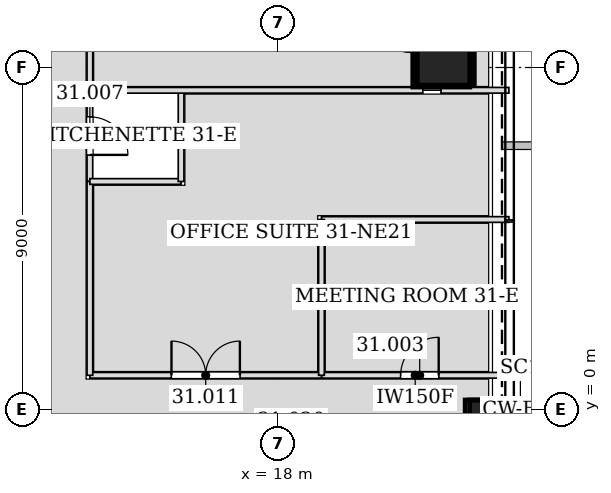
"""IFC4 building model, lengths in metres.
Left out: names, types, materials, properties, quantities, classifications, styles, units other than length and angle.
Written with IfcOpenShell. Run it as: python <this file> out.ifc"""

import sys

from ifc_helpers import new_model, si_unit, direction, frame, frame_2d, origin, origin_2d, place, context, subcontext, project, spatial, rectangle, hollow_rectangle, extrude, element, fill, save


model = new_model("IFC4")
c1 = context("Model", 3, precision=1e-05, world=origin(), true_north=direction((0.0, 1.0)))
c2 = subcontext(c1, "Body", "Model", "MODEL_VIEW")
j1 = project(units=[si_unit("LENGTHUNIT", "METRE"), si_unit("PLANEANGLEUNIT", "RADIAN")], contexts=[c1])
p1 = place(None, origin())
s1 = spatial("IfcSite", under=j1, at=p1, CompositionType="ELEMENT")
p2 = place(p1, origin())
s2 = spatial("IfcBuilding", under=s1, at=p2, CompositionType="ELEMENT")
p3 = place(p2, frame((0.0, 0.0, 138.6)))
s3 = spatial("IfcBuildingStorey", under=s2, at=p3, CompositionType="ELEMENT", Elevation=138.6)
p4 = place(p3, frame((22.416, 9.285, 0.0), z_axis=(-0.028295730207, -0.011736627314, 0.99953069149), x_axis=(0.383133442967, -0.923693003589, 0.0)))
e1 = element("IfcColumn", 1, at=p4, inside=s3, PredefinedType="COLUMN", context=c2, shape_type="SweptSolid", body=[
    extrude(hollow_rectangle(XDim=1.5, YDim=1.5, WallThickness=0.07, at=origin_2d()), origin(), (0.0, 0.0, 1.0), 4.202),
])
p5 = place(p3, frame((23.294, 0.0, 0.0), z_axis=(-0.028297679255, 0.0, 0.99959954049), x_axis=(0.0, -1.0, 0.0)))
e2 = element("IfcColumn", 2, at=p5, inside=s3, PredefinedType="COLUMN", context=c2, shape_type="SweptSolid", body=[
    extrude(hollow_rectangle(XDim=0.5, YDim=0.5, WallThickness=0.025, at=origin_2d()), origin(), (0.0, 0.0, 1.0), 4.202),
])
p6 = place(p3, frame((24.078, 0.9, 0.0), z_axis=(0.0, 0.0, 1.0), x_axis=(-1.0, 0.0, 0.0)))
e3 = element("IfcWall", 3, at=p6, inside=s3, PredefinedType="PARTITIONING", context=c2, shape_type="SweptSolid", body=[
    extrude(rectangle(XDim=4.935, YDim=0.15, at=frame_2d((2.468, 0.0))), origin(), (0.0, 0.0, 1.0), 3.426),
])
p7 = place(p6, frame((1.85, 0.0, 0.0)))
e4 = element("IfcOpeningElement", 4, at=p7, cuts=e3, PredefinedType="OPENING", context=c2, shape_type="SweptSolid", body=[
    extrude(rectangle(XDim=1.0, YDim=2.1, at=frame_2d((0.5, 1.05))), frame((0.0, 0.085, 0.0), z_axis=(0.0, -1.0, 0.0), x_axis=(1.0, 0.0, 0.0)), (0.0, 0.0, 1.0), 0.17),
])
p8 = place(p3, frame((13.05, 5.999, 0.0), z_axis=(0.0, 0.0, 1.0), x_axis=(0.0, 1.0, 0.0)))
e5 = element("IfcWall", 5, at=p8, inside=s3, PredefinedType="PARTITIONING", context=c2, shape_type="SweptSolid", body=[
    extrude(rectangle(XDim=2.402, YDim=0.15, at=frame_2d((1.201, 0.0))), origin(), (0.0, 0.0, 1.0), 4.035),
])
p9 = place(p8, frame((0.701, 0.0, 0.0)))
e6 = element("IfcOpeningElement", 6, at=p9, cuts=e5, PredefinedType="OPENING", context=c2, shape_type="SweptSolid", body=[
    extrude(rectangle(XDim=1.0, YDim=2.1, at=frame_2d((0.5, 1.05))), frame((0.0, 0.085, 0.0), z_axis=(0.0, -1.0, 0.0), x_axis=(1.0, 0.0, 0.0)), (0.0, 0.0, 1.0), 0.17),
])
p10 = place(p3, frame((19.145, 0.9, 0.0), z_axis=(0.0, 0.0, 1.0), x_axis=(-1.0, 0.0, 0.0)))
e7 = element("IfcWall", 7, at=p10, inside=s3, PredefinedType="PARTITIONING", context=c2, shape_type="SweptSolid", body=[
    extrude(rectangle(XDim=6.095, YDim=0.15, at=frame_2d((3.047, 0.0))), origin(), (0.0, 0.0, 1.0), 3.426),
])
p11 = place(p10, frame((2.147, 0.0, 0.0)))
e8 = element("IfcOpeningElement", 8, at=p11, cuts=e7, PredefinedType="OPENING", context=c2, shape_type="SweptSolid", body=[
    extrude(rectangle(XDim=1.8, YDim=2.4, at=frame_2d((0.9, 1.2))), frame((0.0, 0.085, 0.0), z_axis=(0.0, -1.0, 0.0), x_axis=(1.0, 0.0, 0.0)), (0.0, 0.0, 1.0), 0.17),
])
p12 = place(p3, frame((13.05, 0.9, 0.0), z_axis=(0.0, 0.0, 1.0), x_axis=(0.0, 1.0, 0.0)))
e9 = element("IfcWall", 9, at=p12, inside=s3, PredefinedType="PARTITIONING", context=c2, shape_type="SweptSolid", body=[
    extrude(rectangle(XDim=5.101, YDim=0.15, at=frame_2d((2.551, 0.0))), origin(), (0.0, 0.0, 1.0), 4.035),
])
p13 = place(p3, frame((13.05, 8.399, 0.0), z_axis=(0.0, 0.0, 1.0), x_axis=(0.0, 1.0, 0.0)))
e10 = element("IfcWall", 10, at=p13, inside=s3, PredefinedType="PARTITIONING", context=c2, shape_type="SweptSolid", body=[
    extrude(rectangle(XDim=4.651, YDim=0.15, at=frame_2d((2.326, 0.0))), origin(), (0.0, 0.0, 1.0), 3.042),
])
p14 = place(p13, frame((1.426, 0.0, 0.0)))
e11 = element("IfcOpeningElement", 11, at=p14, cuts=e10, PredefinedType="OPENING", context=c2, shape_type="SweptSolid", body=[
    extrude(rectangle(XDim=1.8, YDim=2.4, at=frame_2d((0.9, 1.2))), frame((0.0, 0.085, 0.0), z_axis=(0.0, -1.0, 0.0), x_axis=(1.0, 0.0, 0.0)), (0.0, 0.0, 1.0), 0.17),
])
p15 = place(p3, frame((24.076, 5.0, 0.0), z_axis=(0.0, 0.0, 1.0), x_axis=(-1.0, 0.0, 0.0)))
e12 = element("IfcWall", 12, at=p15, inside=s3, PredefinedType="PARTITIONING", context=c2, shape_type="SweptSolid", body=[
    extrude(rectangle(XDim=4.932, YDim=0.15, at=frame_2d((2.466, 0.0))), origin(), (0.0, 0.0, 1.0), 3.426),
])
p16 = place(p3, frame((19.144, 5.0, 0.0), z_axis=(0.0, 0.0, 1.0), x_axis=(0.0, -1.0, 0.0)))
e13 = element("IfcWall", 13, at=p16, inside=s3, PredefinedType="PARTITIONING", context=c2, shape_type="SweptSolid", body=[
    extrude(rectangle(XDim=4.1, YDim=0.15, at=frame_2d((2.05, 0.0))), origin(), (0.0, 0.0, 1.0), 4.035),
])
p17 = place(p3, frame((13.05, 6.0, 0.0), z_axis=(0.0, 0.0, 1.0), x_axis=(1.0, 0.0, 0.0)))
e14 = element("IfcWall", 14, at=p17, inside=s3, PredefinedType="PARTITIONING", context=c2, shape_type="SweptSolid", body=[
    extrude(rectangle(XDim=2.4, YDim=0.15, at=frame_2d((1.2, 0.0))), origin(), (0.0, 0.0, 1.0), 3.426),
])
p18 = place(p3, frame((15.45, 6.0, 0.0), z_axis=(0.0, 0.0, 1.0), x_axis=(0.0, 1.0, 0.0)))
e15 = element("IfcWall", 15, at=p18, inside=s3, PredefinedType="PARTITIONING", context=c2, shape_type="SweptSolid", body=[
    extrude(rectangle(XDim=2.4, YDim=0.15, at=frame_2d((1.2, 0.0))), origin(), (0.0, 0.0, 1.0), 4.035),
])
p19 = place(p3, frame((13.05, 8.4, 0.0), z_axis=(0.0, 0.0, 1.0), x_axis=(1.0, 0.0, 0.0)))
e16 = element("IfcWall", 16, at=p19, inside=s3, PredefinedType="PARTITIONING", context=c2, shape_type="SweptSolid", body=[
    extrude(rectangle(XDim=8.76, YDim=0.15, at=frame_2d((4.38, 0.0))), origin(), (0.0, 0.0, 1.0), 3.426),
])
p20 = place(p3, frame((24.076, 8.4, 0.0), z_axis=(0.0, 0.0, 1.0), x_axis=(-1.0, 0.0, 0.0)))
e17 = element("IfcWall", 17, at=p20, inside=s3, PredefinedType="PARTITIONING", context=c2, shape_type="SweptSolid", body=[
    extrude(rectangle(XDim=1.787, YDim=0.15, at=frame_2d((0.894, 0.0))), origin(), (0.0, 0.0, 1.0), 3.499),
])
p21 = place(p7, frame((1.0, 0.0, 0.0), z_axis=(0.0, 0.0, 1.0), x_axis=(-1.0, 0.0, 0.0)))
e18 = element("IfcDoor", 18, at=p21, inside=s3, OperationType="SINGLE_SWING_RIGHT", PredefinedType="DOOR", context=c2, shape_type="SweptSolid", body=[
    extrude(rectangle(XDim=1.0, YDim=2.1, at=frame_2d((0.5, 1.05))), frame((0.0, 0.025, 0.0), z_axis=(0.0, -1.0, 0.0), x_axis=(1.0, 0.0, 0.0)), (0.0, 0.0, 1.0), 0.05),
])
fill(e4, e18)
p22 = place(p9, frame((1.0, 0.0, 0.0), z_axis=(0.0, 0.0, 1.0), x_axis=(-1.0, 0.0, 0.0)))
e19 = element("IfcDoor", 19, at=p22, inside=s3, OperationType="SINGLE_SWING_RIGHT", PredefinedType="DOOR", context=c2, shape_type="SweptSolid", body=[
    extrude(rectangle(XDim=1.0, YDim=2.1, at=frame_2d((0.5, 1.05))), frame((0.0, 0.025, 0.0), z_axis=(0.0, -1.0, 0.0), x_axis=(1.0, 0.0, 0.0)), (0.0, 0.0, 1.0), 0.05),
])
fill(e6, e19)
p23 = place(p11, frame((1.8, 0.0, 0.0), z_axis=(0.0, 0.0, 1.0), x_axis=(-1.0, 0.0, 0.0)))
e20 = element("IfcDoor", 20, at=p23, inside=s3, OperationType="DOUBLE_DOOR_SINGLE_SWING", PredefinedType="DOOR", context=c2, shape_type="SweptSolid", body=[
    extrude(rectangle(XDim=1.8, YDim=2.4, at=frame_2d((0.9, 1.2))), frame((0.0, 0.025, 0.0), z_axis=(0.0, -1.0, 0.0), x_axis=(1.0, 0.0, 0.0)), (0.0, 0.0, 1.0), 0.05),
])
fill(e8, e20)
save(model, sys.argv[1])
